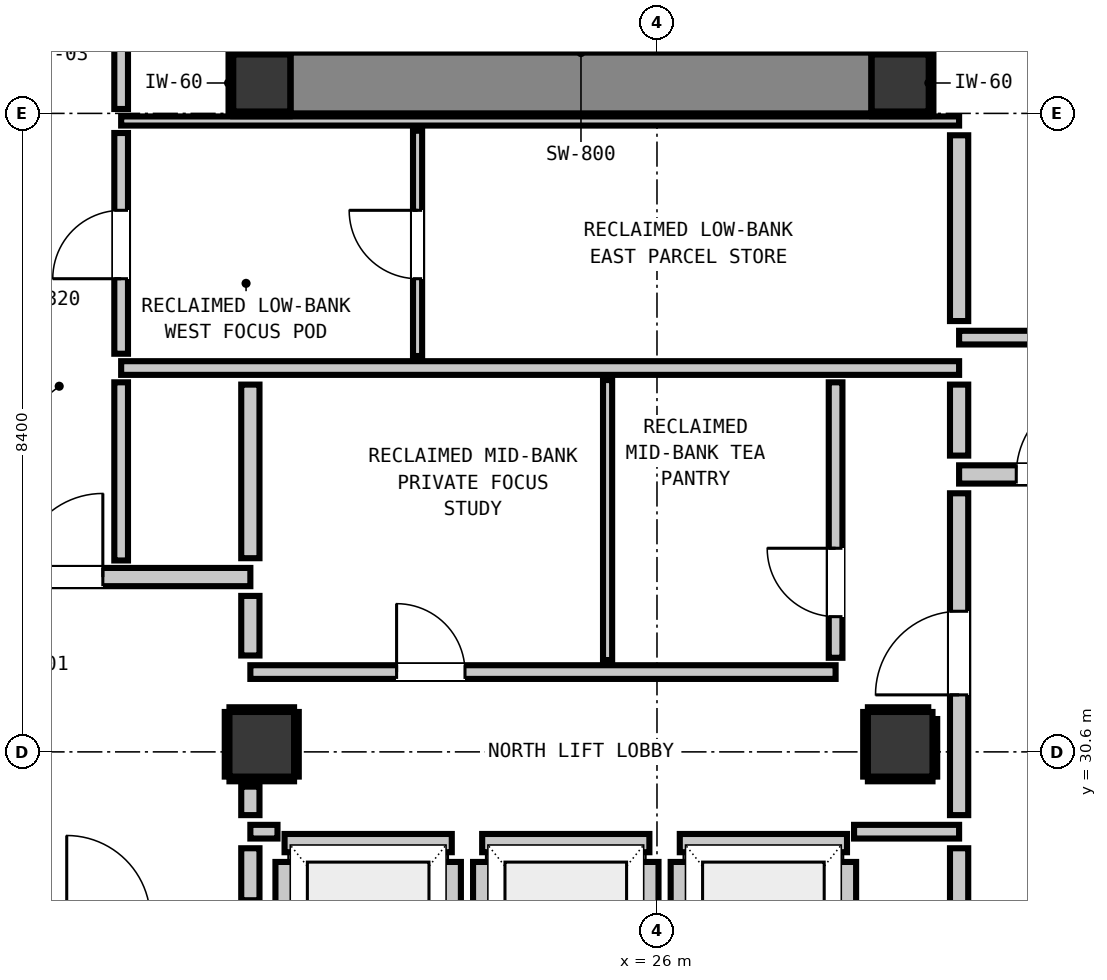
"""IFC4 building model, lengths in metres.
Left out: names, types, materials, properties, quantities, classifications, styles, units other than length and angle.
Written with IfcOpenShell. Run it as: python <this file> out.ifc"""

import sys

from ifc_helpers import new_model, si_unit, direction, frame, frame_2d, origin, origin_2d, place, context, subcontext, project, spatial, rectangle, extrude, element, fill, save


model = new_model("IFC4")
c1 = context("Model", 3, precision=1e-05, world=origin(), true_north=direction((0.0, 1.0)))
c2 = subcontext(c1, "Body", "Model", "MODEL_VIEW")
j1 = project(units=[si_unit("LENGTHUNIT", "METRE"), si_unit("PLANEANGLEUNIT", "RADIAN")], contexts=[c1])
p1 = place(None, origin())
s1 = spatial("IfcSite", under=j1, at=p1, CompositionType="ELEMENT")
p2 = place(p1, origin())
s2 = spatial("IfcBuilding", under=s1, at=p2, CompositionType="ELEMENT")
p3 = place(p2, frame((0.0, 0.0, 216.72)))
s3 = spatial("IfcBuildingStorey", under=s2, at=p3, CompositionType="ELEMENT", Elevation=216.72)
for number, where, z_axis, x_axis in (
    (1, (20.8, 39.4, 0.0), (0.0, 0.0, 1.0), (1.0, 0.0, 0.0)),
    (2, (29.2, 39.4, 0.0), (0.0, 0.0, 1.0), (1.0, 0.0, 0.0)),
):
    element("IfcColumn", number, at=place(p3, frame(where, z_axis=z_axis, x_axis=x_axis)), inside=s3, PredefinedType="COLUMN", context=c2, shape_type="SweptSolid", body=[
        extrude(rectangle(XDim=0.75, YDim=0.75, at=origin_2d()), origin(), (0.0, 0.0, 1.0), 3.32),
    ])
p4 = place(p3, frame((21.18, 39.4, 0.0), z_axis=(0.0, 0.0, 1.0), x_axis=(1.0, 0.0, 0.0)))
e3 = element("IfcWall", 3, at=p4, inside=s3, PredefinedType="SHEAR", context=c2, shape_type="SweptSolid", body=[
    extrude(rectangle(XDim=7.64, YDim=0.8, at=frame_2d((3.82, 0.0))), origin(), (0.0, 0.0, 1.0), 3.32),
])
for number, where, z_axis, x_axis in (
    (4, (20.8, 30.7, 0.0), (0.0, 0.0, 1.0), (1.0, 0.0, 0.0)),
    (5, (29.2, 30.7, 0.0), (0.0, 0.0, 1.0), (1.0, 0.0, 0.0)),
):
    element("IfcColumn", number, at=place(p3, frame(where, z_axis=z_axis, x_axis=x_axis)), inside=s3, PredefinedType="COLUMN", context=c2, shape_type="SweptSolid", body=[
        extrude(rectangle(XDim=0.85, YDim=0.85, at=origin_2d()), origin(), (0.0, 0.0, 1.0), 3.32),
    ])
p5 = place(p3, frame((21.1, 29.4, 0.0), z_axis=(0.0, 0.0, 1.0), x_axis=(1.0, 0.0, 0.0)))
e6 = element("IfcWall", 6, at=p5, inside=s3, PredefinedType="PARTITIONING", context=c2, shape_type="SweptSolid", body=[
    extrude(rectangle(XDim=2.2, YDim=0.24, at=frame_2d((1.1, 0.0))), origin(), (0.0, 0.0, 1.0), 3.1),
])
p6 = place(p3, frame((21.1, 27.048, 0.0), z_axis=(0.0, 0.0, 1.0), x_axis=(0.0, 1.0, 0.0)))
e7 = element("IfcWall", 7, at=p6, inside=s3, PredefinedType="PARTITIONING", context=c2, shape_type="SweptSolid", body=[
    extrude(rectangle(XDim=2.104, YDim=0.24, at=frame_2d((1.052, 0.0))), origin(), (0.0, 0.0, 1.0), 2.335),
])
p7 = place(p3, frame((23.3, 27.048, 0.0), z_axis=(0.0, 0.0, 1.0), x_axis=(0.0, 1.0, 0.0)))
e8 = element("IfcWall", 8, at=p7, inside=s3, PredefinedType="PARTITIONING", context=c2, shape_type="SweptSolid", body=[
    extrude(rectangle(XDim=2.104, YDim=0.24, at=frame_2d((1.052, 0.0))), origin(), (0.0, 0.0, 1.0), 3.1),
])
p8 = place(p3, frame((23.7, 29.4, 0.0), z_axis=(0.0, 0.0, 1.0), x_axis=(1.0, 0.0, 0.0)))
e9 = element("IfcWall", 9, at=p8, inside=s3, PredefinedType="PARTITIONING", context=c2, shape_type="SweptSolid", body=[
    extrude(rectangle(XDim=2.2, YDim=0.24, at=frame_2d((1.1, 0.0))), origin(), (0.0, 0.0, 1.0), 3.1),
])
for number, where, z_axis, x_axis in (
    (10, (23.7, 27.048, 0.0), (0.0, 0.0, 1.0), (0.0, 1.0, 0.0)),
    (11, (25.9, 27.048, 0.0), (0.0, 0.0, 1.0), (0.0, 1.0, 0.0)),
):
    element("IfcWall", number, at=place(p3, frame(where, z_axis=z_axis, x_axis=x_axis)), inside=s3, PredefinedType="PARTITIONING", context=c2, shape_type="SweptSolid", body=[
        extrude(rectangle(XDim=2.104, YDim=0.24, at=frame_2d((1.052, 0.0))), origin(), (0.0, 0.0, 1.0), 3.1),
    ])
p9 = place(p3, frame((26.3, 29.4, 0.0), z_axis=(0.0, 0.0, 1.0), x_axis=(1.0, 0.0, 0.0)))
e12 = element("IfcWall", 12, at=p9, inside=s3, PredefinedType="PARTITIONING", context=c2, shape_type="SweptSolid", body=[
    extrude(rectangle(XDim=2.2, YDim=0.24, at=frame_2d((1.1, 0.0))), origin(), (0.0, 0.0, 1.0), 3.1),
])
p10 = place(p3, frame((26.3, 27.048, 0.0), z_axis=(0.0, 0.0, 1.0), x_axis=(0.0, 1.0, 0.0)))
e13 = element("IfcWall", 13, at=p10, inside=s3, PredefinedType="PARTITIONING", context=c2, shape_type="SweptSolid", body=[
    extrude(rectangle(XDim=2.104, YDim=0.24, at=frame_2d((1.052, 0.0))), origin(), (0.0, 0.0, 1.0), 3.1),
])
p11 = place(p3, frame((28.5, 27.33, 0.0), z_axis=(0.0, 0.0, 1.0), x_axis=(0.0, 1.0, 0.0)))
e14 = element("IfcWall", 14, at=p11, inside=s3, PredefinedType="PARTITIONING", context=c2, shape_type="SweptSolid", body=[
    extrude(rectangle(XDim=1.822, YDim=0.24, at=frame_2d((0.911, 0.0))), origin(), (0.0, 0.0, 1.0), 3.1),
])
p12 = place(p3, frame((17.45, 32.9, 0.0), z_axis=(0.0, 0.0, 1.0), x_axis=(1.0, 0.0, 0.0)))
e15 = element("IfcWall", 15, at=p12, inside=s3, PredefinedType="PARTITIONING", context=c2, shape_type="SweptSolid", body=[
    extrude(rectangle(XDim=3.2, YDim=0.24, at=frame_2d((1.6, 0.0))), origin(), (0.0, 0.0, 1.0), 3.1),
])
p13 = place(p12, frame((0.159, 0.0, 0.0)))
e16 = element("IfcOpeningElement", 16, at=p13, cuts=e15, PredefinedType="OPENING", context=c2, shape_type="SweptSolid", body=[
    extrude(rectangle(XDim=1.1, YDim=2.15, at=frame_2d((0.55, 1.075))), frame((0.0, 0.13, 0.0), z_axis=(0.0, -1.0, 0.0), x_axis=(1.0, 0.0, 0.0)), (0.0, 0.0, 1.0), 0.26),
])
p14 = place(p3, frame((29.975, 34.25, 0.0), z_axis=(0.0, 0.0, 1.0), x_axis=(1.0, 0.0, 0.0)))
e17 = element("IfcWall", 17, at=p14, inside=s3, PredefinedType="PARTITIONING", context=c2, shape_type="SweptSolid", body=[
    extrude(rectangle(XDim=2.475, YDim=0.24, at=frame_2d((1.237, 0.0))), origin(), (0.0, 0.0, 1.0), 3.1),
])
p15 = place(p14, frame((0.752, 0.0, 0.0)))
e18 = element("IfcOpeningElement", 18, at=p15, cuts=e17, PredefinedType="OPENING", context=c2, shape_type="SweptSolid", body=[
    extrude(rectangle(XDim=1.1, YDim=2.15, at=frame_2d((0.55, 1.075))), frame((0.0, 0.13, 0.0), z_axis=(0.0, -1.0, 0.0), x_axis=(1.0, 0.0, 0.0)), (0.0, 0.0, 1.0), 0.26),
])
p16 = place(p3, frame((20.65, 29.55, 0.0), z_axis=(0.0, 0.0, 1.0), x_axis=(1.0, 0.0, 0.0)))
e19 = element("IfcWall", 19, at=p16, inside=s3, PredefinedType="PARTITIONING", context=c2, shape_type="SweptSolid", body=[
    extrude(rectangle(XDim=0.357, YDim=0.18, at=frame_2d((0.179, 0.0))), origin(), (0.0, 0.0, 1.0), 3.1),
])
p17 = place(p3, frame((28.593, 29.55, 0.0), z_axis=(0.0, 0.0, 1.0), x_axis=(1.0, 0.0, 0.0)))
e20 = element("IfcWall", 20, at=p17, inside=s3, PredefinedType="PARTITIONING", context=c2, shape_type="SweptSolid", body=[
    extrude(rectangle(XDim=1.382, YDim=0.18, at=frame_2d((0.691, 0.0))), origin(), (0.0, 0.0, 1.0), 3.1),
])
p18 = place(p3, frame((20.65, 31.65, 0.0), z_axis=(0.0, 0.0, 1.0), x_axis=(1.0, 0.0, 0.0)))
e21 = element("IfcWall", 21, at=p18, inside=s3, PredefinedType="PARTITIONING", context=c2, shape_type="SweptSolid", body=[
    extrude(rectangle(XDim=7.7, YDim=0.18, at=frame_2d((3.85, 0.0))), origin(), (0.0, 0.0, 1.0), 3.1),
])
p19 = place(p18, frame((1.924, 0.0, 0.0)))
e22 = element("IfcOpeningElement", 22, at=p19, cuts=e21, PredefinedType="OPENING", context=c2, shape_type="SweptSolid", body=[
    extrude(rectangle(XDim=0.9, YDim=2.1, at=frame_2d((0.45, 1.05))), frame((0.0, 0.1, 0.0), z_axis=(0.0, -1.0, 0.0), x_axis=(1.0, 0.0, 0.0)), (0.0, 0.0, 1.0), 0.2),
])
p20 = place(p3, frame((18.95, 35.65, 0.0), z_axis=(0.0, 0.0, 1.0), x_axis=(1.0, 0.0, 0.0)))
e23 = element("IfcWall", 23, at=p20, inside=s3, PredefinedType="PARTITIONING", context=c2, shape_type="SweptSolid", body=[
    extrude(rectangle(XDim=11.025, YDim=0.18, at=frame_2d((5.513, 0.0))), origin(), (0.0, 0.0, 1.0), 3.1),
])
p21 = place(p3, frame((29.975, 36.05, 0.0), z_axis=(0.0, 0.0, 1.0), x_axis=(1.0, 0.0, 0.0)))
e24 = element("IfcWall", 24, at=p21, inside=s3, PredefinedType="PARTITIONING", context=c2, shape_type="SweptSolid", body=[
    extrude(rectangle(XDim=2.505, YDim=0.18, at=frame_2d((1.252, 0.0))), origin(), (0.0, 0.0, 1.0), 3.1),
])
p22 = place(p3, frame((18.95, 38.9, 0.0), z_axis=(0.0, 0.0, 1.0), x_axis=(1.0, 0.0, 0.0)))
e25 = element("IfcWall", 25, at=p22, inside=s3, PredefinedType="PARTITIONING", context=c2, shape_type="SweptSolid", body=[
    extrude(rectangle(XDim=11.025, YDim=0.12, at=frame_2d((5.513, 0.0))), origin(), (0.0, 0.0, 1.0), 3.1),
])
p23 = place(p3, frame((20.65, 28.648, 0.0), z_axis=(0.0, 0.0, 1.0), x_axis=(0.0, 1.0, 0.0)))
e26 = element("IfcWall", 26, at=p23, inside=s3, PredefinedType="PARTITIONING", context=c2, shape_type="SweptSolid", body=[
    extrude(rectangle(XDim=0.684, YDim=0.24, at=frame_2d((0.342, 0.0))), origin(), (0.0, 0.0, 1.0), 2.335),
])
p24 = place(p3, frame((20.65, 29.768, 0.0), z_axis=(0.0, 0.0, 1.0), x_axis=(0.0, 1.0, 0.0)))
e27 = element("IfcWall", 27, at=p24, inside=s3, PredefinedType="PARTITIONING", context=c2, shape_type="SweptSolid", body=[
    extrude(rectangle(XDim=0.375, YDim=0.24, at=frame_2d((0.188, 0.0))), origin(), (0.0, 0.0, 1.0), 2.335),
])
p25 = place(p3, frame((20.65, 31.868, 0.0), z_axis=(0.0, 0.0, 1.0), x_axis=(0.0, 1.0, 0.0)))
e28 = element("IfcWall", 28, at=p25, inside=s3, PredefinedType="PARTITIONING", context=c2, shape_type="SweptSolid", body=[
    extrude(rectangle(XDim=0.784, YDim=0.24, at=frame_2d((0.392, 0.0))), origin(), (0.0, 0.0, 1.0), 2.335),
])
p26 = place(p3, frame((20.65, 33.148, 0.0), z_axis=(0.0, 0.0, 1.0), x_axis=(0.0, 1.0, 0.0)))
e29 = element("IfcWall", 29, at=p26, inside=s3, PredefinedType="PARTITIONING", context=c2, shape_type="SweptSolid", body=[
    extrude(rectangle(XDim=2.284, YDim=0.24, at=frame_2d((1.142, 0.0))), origin(), (0.0, 0.0, 1.0), 2.335),
])
p27 = place(p3, frame((29.975, 25.648, 0.0), z_axis=(0.0, 0.0, 1.0), x_axis=(0.0, 1.0, 0.0)))
e30 = element("IfcWall", 30, at=p27, inside=s3, PredefinedType="PARTITIONING", context=c2, shape_type="SweptSolid", body=[
    extrude(rectangle(XDim=3.684, YDim=0.24, at=frame_2d((1.842, 0.0))), origin(), (0.0, 0.0, 1.0), 3.1),
])
p28 = place(p3, frame((29.975, 29.768, 0.0), z_axis=(0.0, 0.0, 1.0), x_axis=(0.0, 1.0, 0.0)))
e31 = element("IfcWall", 31, at=p28, inside=s3, PredefinedType="PARTITIONING", context=c2, shape_type="SweptSolid", body=[
    extrude(rectangle(XDim=4.234, YDim=0.24, at=frame_2d((2.117, 0.0))), origin(), (0.0, 0.0, 1.0), 3.1),
])
p29 = place(p28, frame((1.582, 0.0, 0.0)))
e32 = element("IfcOpeningElement", 32, at=p29, cuts=e31, PredefinedType="OPENING", context=c2, shape_type="SweptSolid", body=[
    extrude(rectangle(XDim=1.1, YDim=2.15, at=frame_2d((0.55, 1.075))), frame((0.0, 0.13, 0.0), z_axis=(0.0, -1.0, 0.0), x_axis=(1.0, 0.0, 0.0)), (0.0, 0.0, 1.0), 0.26),
])
p30 = place(p3, frame((29.975, 34.498, 0.0), z_axis=(0.0, 0.0, 1.0), x_axis=(0.0, 1.0, 0.0)))
e33 = element("IfcWall", 33, at=p30, inside=s3, PredefinedType="PARTITIONING", context=c2, shape_type="SweptSolid", body=[
    extrude(rectangle(XDim=0.934, YDim=0.24, at=frame_2d((0.467, 0.0))), origin(), (0.0, 0.0, 1.0), 3.1),
])
p31 = place(p3, frame((29.975, 36.268, 0.0), z_axis=(0.0, 0.0, 1.0), x_axis=(0.0, 1.0, 0.0)))
e34 = element("IfcWall", 34, at=p31, inside=s3, PredefinedType="PARTITIONING", context=c2, shape_type="SweptSolid", body=[
    extrude(rectangle(XDim=2.444, YDim=0.24, at=frame_2d((1.222, 0.0))), origin(), (0.0, 0.0, 1.0), 3.1),
])
p32 = place(p3, frame((18.95, 33.118, 0.0), z_axis=(0.0, 0.0, 1.0), x_axis=(0.0, 1.0, 0.0)))
e35 = element("IfcWall", 35, at=p32, inside=s3, PredefinedType="PARTITIONING", context=c2, shape_type="SweptSolid", body=[
    extrude(rectangle(XDim=2.344, YDim=0.18, at=frame_2d((1.172, 0.0))), origin(), (0.0, 0.0, 1.0), 3.1),
])
p33 = place(p3, frame((18.95, 35.838, 0.0), z_axis=(0.0, 0.0, 1.0), x_axis=(0.0, 1.0, 0.0)))
e36 = element("IfcWall", 36, at=p33, inside=s3, PredefinedType="PARTITIONING", context=c2, shape_type="SweptSolid", body=[
    extrude(rectangle(XDim=2.904, YDim=0.18, at=frame_2d((1.452, 0.0))), origin(), (0.0, 0.0, 1.0), 3.1),
])
p34 = place(p33, frame((0.987, 0.0, 0.0)))
e37 = element("IfcOpeningElement", 37, at=p34, cuts=e36, PredefinedType="OPENING", context=c2, shape_type="SweptSolid", body=[
    extrude(rectangle(XDim=0.9, YDim=2.1, at=frame_2d((0.45, 1.05))), frame((0.0, 0.1, 0.0), z_axis=(0.0, -1.0, 0.0), x_axis=(1.0, 0.0, 0.0)), (0.0, 0.0, 1.0), 0.2),
])
p35 = place(p3, frame((18.95, 39.058, 0.0), z_axis=(0.0, 0.0, 1.0), x_axis=(0.0, 1.0, 0.0)))
e38 = element("IfcWall", 38, at=p35, inside=s3, PredefinedType="PARTITIONING", context=c2, shape_type="SweptSolid", body=[
    extrude(rectangle(XDim=1.004, YDim=0.18, at=frame_2d((0.502, 0.0))), origin(), (0.0, 0.0, 1.0), 3.1),
])
p36 = place(p3, frame((28.35, 31.838, 0.0), z_axis=(0.0, 0.0, 1.0), x_axis=(0.0, 1.0, 0.0)))
e39 = element("IfcWall", 39, at=p36, inside=s3, PredefinedType="PARTITIONING", context=c2, shape_type="SweptSolid", body=[
    extrude(rectangle(XDim=3.624, YDim=0.18, at=frame_2d((1.812, 0.0))), origin(), (0.0, 0.0, 1.0), 3.1),
])
p37 = place(p36, frame((0.541, 0.0, 0.0)))
e40 = element("IfcOpeningElement", 40, at=p37, cuts=e39, PredefinedType="OPENING", context=c2, shape_type="SweptSolid", body=[
    extrude(rectangle(XDim=0.9, YDim=2.1, at=frame_2d((0.45, 1.05))), frame((0.0, 0.1, 0.0), z_axis=(0.0, -1.0, 0.0), x_axis=(1.0, 0.0, 0.0)), (0.0, 0.0, 1.0), 0.2),
])
p38 = place(p3, frame((22.85, 35.808, 0.0), z_axis=(0.0, 0.0, 1.0), x_axis=(0.0, 1.0, 0.0)))
e41 = element("IfcWall", 41, at=p38, inside=s3, PredefinedType="PARTITIONING", context=c2, shape_type="SweptSolid", body=[
    extrude(rectangle(XDim=2.964, YDim=0.12, at=frame_2d((1.482, 0.0))), origin(), (0.0, 0.0, 1.0), 3.1),
])
p39 = place(p38, frame((1.017, 0.0, 0.0)))
e42 = element("IfcOpeningElement", 42, at=p39, cuts=e41, PredefinedType="OPENING", context=c2, shape_type="SweptSolid", body=[
    extrude(rectangle(XDim=0.9, YDim=2.1, at=frame_2d((0.45, 1.05))), frame((0.0, 0.07, 0.0), z_axis=(0.0, -1.0, 0.0), x_axis=(1.0, 0.0, 0.0)), (0.0, 0.0, 1.0), 0.14),
])
p40 = place(p3, frame((25.35, 31.808, 0.0), z_axis=(0.0, 0.0, 1.0), x_axis=(0.0, 1.0, 0.0)))
e43 = element("IfcWall", 43, at=p40, inside=s3, PredefinedType="PARTITIONING", context=c2, shape_type="SweptSolid", body=[
    extrude(rectangle(XDim=3.684, YDim=0.12, at=frame_2d((1.842, 0.0))), origin(), (0.0, 0.0, 1.0), 3.1),
])
for number, where, z_axis, x_axis in (
    (44, (20.425, 38.993, 0.0), (0.0, 0.0, 1.0), (1.0, 0.0, 0.0)),
    (45, (20.425, 39.807, 0.0), (0.0, 0.0, 1.0), (1.0, 0.0, 0.0)),
):
    element("IfcWall", number, at=place(p3, frame(where, z_axis=z_axis, x_axis=x_axis)), inside=s3, PredefinedType="PARTITIONING", context=c2, shape_type="SweptSolid", body=[
        extrude(rectangle(XDim=0.742, YDim=0.06, at=frame_2d((0.371, 0.0))), origin(), (0.0, 0.0, 1.0), 1.45),
    ])
p41 = place(p3, frame((20.393, 39.025, 0.0), z_axis=(0.0, 0.0, 1.0), x_axis=(0.0, 1.0, 0.0)))
e46 = element("IfcWall", 46, at=p41, inside=s3, PredefinedType="PARTITIONING", context=c2, shape_type="SweptSolid", body=[
    extrude(rectangle(XDim=0.75, YDim=0.06, at=frame_2d((0.375, 0.0))), origin(), (0.0, 0.0, 1.0), 1.45),
])
for number, where, z_axis, x_axis in (
    (47, (28.833, 38.993, 0.0), (0.0, 0.0, 1.0), (1.0, 0.0, 0.0)),
    (48, (28.833, 39.807, 0.0), (0.0, 0.0, 1.0), (1.0, 0.0, 0.0)),
):
    element("IfcWall", number, at=place(p3, frame(where, z_axis=z_axis, x_axis=x_axis)), inside=s3, PredefinedType="PARTITIONING", context=c2, shape_type="SweptSolid", body=[
        extrude(rectangle(XDim=0.742, YDim=0.06, at=frame_2d((0.371, 0.0))), origin(), (0.0, 0.0, 1.0), 1.45),
    ])
p42 = place(p3, frame((29.607, 39.025, 0.0), z_axis=(0.0, 0.0, 1.0), x_axis=(0.0, 1.0, 0.0)))
e49 = element("IfcWall", 49, at=p42, inside=s3, PredefinedType="PARTITIONING", context=c2, shape_type="SweptSolid", body=[
    extrude(rectangle(XDim=0.75, YDim=0.06, at=frame_2d((0.375, 0.0))), origin(), (0.0, 0.0, 1.0), 1.45),
])
for number, where, z_axis, x_axis in (
    (50, (20.375, 30.243, 0.0), (0.0, 0.0, 1.0), (1.0, 0.0, 0.0)),
    (51, (20.375, 31.157, 0.0), (0.0, 0.0, 1.0), (1.0, 0.0, 0.0)),
    (52, (20.343, 30.275, 0.0), (0.0, 0.0, 1.0), (0.0, 1.0, 0.0)),
    (53, (21.257, 30.275, 0.0), (0.0, 0.0, 1.0), (0.0, 1.0, 0.0)),
    (54, (28.775, 30.243, 0.0), (0.0, 0.0, 1.0), (1.0, 0.0, 0.0)),
):
    element("IfcWall", number, at=place(p3, frame(where, z_axis=z_axis, x_axis=x_axis)), inside=s3, PredefinedType="PARTITIONING", context=c2, shape_type="SweptSolid", body=[
        extrude(rectangle(XDim=0.85, YDim=0.06, at=frame_2d((0.425, 0.0))), origin(), (0.0, 0.0, 1.0), 1.45),
    ])
p43 = place(p3, frame((28.775, 31.157, 0.0), z_axis=(0.0, 0.0, 1.0), x_axis=(1.0, 0.0, 0.0)))
e55 = element("IfcWall", 55, at=p43, inside=s3, PredefinedType="PARTITIONING", context=c2, shape_type="SweptSolid", body=[
    extrude(rectangle(XDim=0.794, YDim=0.06, at=frame_2d((0.397, 0.0))), origin(), (0.0, 0.0, 1.0), 1.45),
])
p44 = place(p3, frame((28.743, 30.275, 0.0), z_axis=(0.0, 0.0, 1.0), x_axis=(0.0, 1.0, 0.0)))
e56 = element("IfcWall", 56, at=p44, inside=s3, PredefinedType="PARTITIONING", context=c2, shape_type="SweptSolid", body=[
    extrude(rectangle(XDim=0.85, YDim=0.06, at=frame_2d((0.425, 0.0))), origin(), (0.0, 0.0, 1.0), 1.45),
])
p45 = place(p3, frame((29.657, 30.275, 0.0), z_axis=(0.0, 0.0, 1.0), x_axis=(0.0, 1.0, 0.0)))
e57 = element("IfcWall", 57, at=p45, inside=s3, PredefinedType="PARTITIONING", context=c2, shape_type="SweptSolid", body=[
    extrude(rectangle(XDim=0.757, YDim=0.06, at=frame_2d((0.378, 0.0))), origin(), (0.0, 0.0, 1.0), 1.45),
])
p46 = place(p13, origin())
e58 = element("IfcDoor", 58, at=p46, inside=s3, OperationType="SINGLE_SWING_RIGHT", PredefinedType="DOOR", context=c2, shape_type="SweptSolid", body=[
    extrude(rectangle(XDim=1.1, YDim=2.15, at=frame_2d((0.55, 1.075))), frame((0.0, 0.025, 0.0), z_axis=(0.0, -1.0, 0.0), x_axis=(1.0, 0.0, 0.0)), (0.0, 0.0, 1.0), 0.05),
])
fill(e16, e58)
p47 = place(p29, origin())
e59 = element("IfcDoor", 59, at=p47, inside=s3, OperationType="SINGLE_SWING_LEFT", PredefinedType="DOOR", context=c2, shape_type="SweptSolid", body=[
    extrude(rectangle(XDim=1.1, YDim=2.15, at=frame_2d((0.55, 1.075))), frame((0.0, 0.025, 0.0), z_axis=(0.0, -1.0, 0.0), x_axis=(1.0, 0.0, 0.0)), (0.0, 0.0, 1.0), 0.05),
])
fill(e32, e59)
p48 = place(p15, origin())
e60 = element("IfcDoor", 60, at=p48, inside=s3, OperationType="SINGLE_SWING_RIGHT", PredefinedType="DOOR", context=c2, shape_type="SweptSolid", body=[
    extrude(rectangle(XDim=1.1, YDim=2.15, at=frame_2d((0.55, 1.075))), frame((0.0, 0.025, 0.0), z_axis=(0.0, -1.0, 0.0), x_axis=(1.0, 0.0, 0.0)), (0.0, 0.0, 1.0), 0.05),
])
fill(e18, e60)
p49 = place(p34, origin())
e61 = element("IfcDoor", 61, at=p49, inside=s3, OperationType="SINGLE_SWING_LEFT", PredefinedType="DOOR", context=c2, shape_type="SweptSolid", body=[
    extrude(rectangle(XDim=0.9, YDim=2.1, at=frame_2d((0.45, 1.05))), frame((0.0, 0.025, 0.0), z_axis=(0.0, -1.0, 0.0), x_axis=(1.0, 0.0, 0.0)), (0.0, 0.0, 1.0), 0.05),
])
fill(e37, e61)
p50 = place(p39, origin())
e62 = element("IfcDoor", 62, at=p50, inside=s3, OperationType="SINGLE_SWING_RIGHT", PredefinedType="DOOR", context=c2, shape_type="SweptSolid", body=[
    extrude(rectangle(XDim=0.9, YDim=2.1, at=frame_2d((0.45, 1.05))), frame((0.0, 0.025, 0.0), z_axis=(0.0, -1.0, 0.0), x_axis=(1.0, 0.0, 0.0)), (0.0, 0.0, 1.0), 0.05),
])
fill(e42, e62)
p51 = place(p19, origin())
e63 = element("IfcDoor", 63, at=p51, inside=s3, OperationType="SINGLE_SWING_LEFT", PredefinedType="DOOR", context=c2, shape_type="SweptSolid", body=[
    extrude(rectangle(XDim=0.9, YDim=2.1, at=frame_2d((0.45, 1.05))), frame((0.0, 0.025, 0.0), z_axis=(0.0, -1.0, 0.0), x_axis=(1.0, 0.0, 0.0)), (0.0, 0.0, 1.0), 0.05),
])
fill(e22, e63)
p52 = place(p37, origin())
e64 = element("IfcDoor", 64, at=p52, inside=s3, OperationType="SINGLE_SWING_RIGHT", PredefinedType="DOOR", context=c2, shape_type="SweptSolid", body=[
    extrude(rectangle(XDim=0.9, YDim=2.1, at=frame_2d((0.45, 1.05))), frame((0.0, 0.025, 0.0), z_axis=(0.0, -1.0, 0.0), x_axis=(1.0, 0.0, 0.0)), (0.0, 0.0, 1.0), 0.05),
])
fill(e40, e64)
save(model, sys.argv[1])
